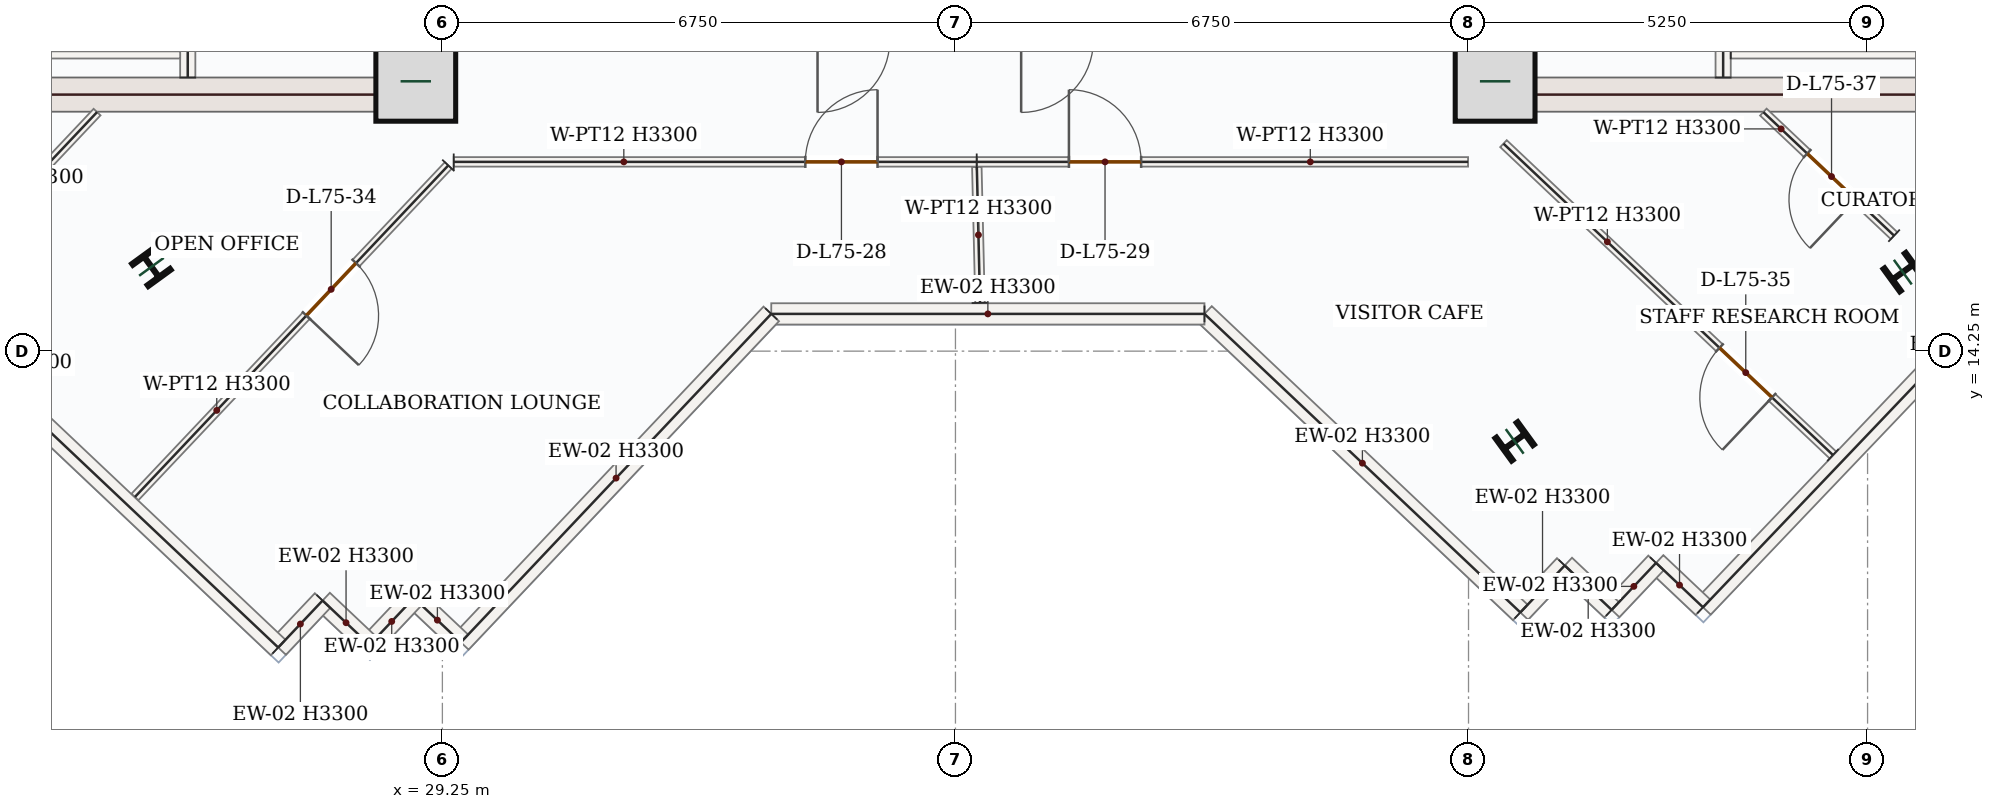
"""IFC4 building model, lengths in metres.
Left out: names, types, materials, properties, quantities, classifications, styles, units other than length and angle.
Written with IfcOpenShell. Run it as: python <this file> out.ifc"""

import sys

from ifc_helpers import new_model, si_unit, direction, frame, frame_2d, origin, origin_2d, place, context, subcontext, project, spatial, rectangle, i_section, extrude, source, transform, mapped, element, fill, save


model = new_model("IFC4")
c1 = context("Model", 3, precision=1e-05, world=origin(), true_north=direction((0.0, 1.0)))
c2 = subcontext(c1, "Body", "Model", "MODEL_VIEW")
j1 = project(units=[si_unit("LENGTHUNIT", "METRE"), si_unit("PLANEANGLEUNIT", "RADIAN")], contexts=[c1])
p1 = place(None, origin())
s1 = spatial("IfcSite", under=j1, at=p1, CompositionType="ELEMENT")
p2 = place(p1, origin())
s2 = spatial("IfcBuilding", under=s1, at=p2, CompositionType="ELEMENT")
p3 = place(p2, frame((0.0, 0.0, 310.35)))
s3 = spatial("IfcBuildingStorey", under=s2, at=p3, CompositionType="ELEMENT", Elevation=310.35)
p4 = place(p3, frame((29.025, 17.4, 0.0), z_axis=(0.0, 0.0, 1.0), x_axis=(0.0, 1.0, 0.0)))
e1 = element("IfcWall", 1, at=p4, inside=s3, PredefinedType="SHEAR", context=c2, shape_type="SweptSolid", body=[
    extrude(rectangle(XDim=8.55, YDim=0.45, at=frame_2d((4.275, 0.0))), origin(), (0.0, 0.0, 1.0), 3.3),
])
p5 = place(p4, frame((6.65, 0.0, 0.0)))
e2 = element("IfcOpeningElement", 2, at=p5, cuts=e1, PredefinedType="OPENING", context=c2, shape_type="SweptSolid", body=[
    extrude(rectangle(XDim=1.1, YDim=2.2, at=frame_2d((0.55, 1.1))), frame((0.0, 0.235, 0.0), z_axis=(0.0, -1.0, 0.0), x_axis=(1.0, 0.0, 0.0)), (0.0, 0.0, 1.0), 0.47),
])
p6 = place(p4, frame((2.7, 0.0, 0.0)))
e3 = element("IfcOpeningElement", 3, at=p6, cuts=e1, PredefinedType="OPENING", context=c2, shape_type="SweptSolid", body=[
    extrude(rectangle(XDim=0.88, YDim=2.1, at=frame_2d((0.44, 1.05))), frame((0.0, 0.235, 0.0), z_axis=(0.0, -1.0, 0.0), x_axis=(1.0, 0.0, 0.0)), (0.0, 0.0, 1.0), 0.47),
])
p7 = place(p4, frame((4.6, 0.0, 0.0)))
e4 = element("IfcOpeningElement", 4, at=p7, cuts=e1, PredefinedType="OPENING", context=c2, shape_type="SweptSolid", body=[
    extrude(rectangle(XDim=0.88, YDim=2.1, at=frame_2d((0.44, 1.05))), frame((0.0, 0.235, 0.0), z_axis=(0.0, -1.0, 0.0), x_axis=(1.0, 0.0, 0.0)), (0.0, 0.0, 1.0), 0.47),
])
m1 = source(origin(), c2, "Body", "SweptSolid", [
    extrude(rectangle(XDim=7.1, YDim=0.45, at=frame_2d((3.55, 0.0))), origin(), (0.0, 0.0, 1.0), 3.3),
])
p8 = place(p3, frame((21.7, 17.625, 0.0), z_axis=(0.0, 0.0, 1.0), x_axis=(1.0, 0.0, 0.0)))
e5 = element("IfcWall", 5, at=p8, inside=s3, PredefinedType="SHEAR", context=c2, shape_type="MappedRepresentation", body=[
    mapped(m1, transform((0.0, 0.0, 0.0), x_axis=(1.0, 0.0, 0.0), y_axis=(0.0, 1.0, 0.0), z_axis=(0.0, 0.0, 1.0), scale=1.0)),
])
p9 = place(p3, frame((42.975, 17.4, 0.0), z_axis=(0.0, 0.0, 1.0), x_axis=(0.0, 1.0, 0.0)))
e6 = element("IfcWall", 6, at=p9, inside=s3, PredefinedType="SHEAR", context=c2, shape_type="SweptSolid", body=[
    extrude(rectangle(XDim=8.55, YDim=0.45, at=frame_2d((4.275, 0.0))), origin(), (0.0, 0.0, 1.0), 3.3),
])
p10 = place(p9, frame((6.65, 0.0, 0.0)))
e7 = element("IfcOpeningElement", 7, at=p10, cuts=e6, PredefinedType="OPENING", context=c2, shape_type="SweptSolid", body=[
    extrude(rectangle(XDim=1.1, YDim=2.2, at=frame_2d((0.55, 1.1))), frame((0.0, 0.235, 0.0), z_axis=(0.0, -1.0, 0.0), x_axis=(1.0, 0.0, 0.0)), (0.0, 0.0, 1.0), 0.47),
])
p11 = place(p9, frame((1.75, 0.0, 0.0)))
e8 = element("IfcOpeningElement", 8, at=p11, cuts=e6, PredefinedType="OPENING", context=c2, shape_type="SweptSolid", body=[
    extrude(rectangle(XDim=1.3, YDim=2.2, at=frame_2d((0.65, 1.1))), frame((0.0, 0.235, 0.0), z_axis=(0.0, -1.0, 0.0), x_axis=(1.0, 0.0, 0.0)), (0.0, 0.0, 1.0), 0.47),
])
p12 = place(p9, frame((4.3, 0.0, 0.0)))
e9 = element("IfcOpeningElement", 9, at=p12, cuts=e6, PredefinedType="OPENING", context=c2, shape_type="SweptSolid", body=[
    extrude(rectangle(XDim=0.88, YDim=2.1, at=frame_2d((0.44, 1.05))), frame((0.0, 0.235, 0.0), z_axis=(0.0, -1.0, 0.0), x_axis=(1.0, 0.0, 0.0)), (0.0, 0.0, 1.0), 0.47),
])
p13 = place(p3, frame((43.2, 17.625, 0.0), z_axis=(0.0, 0.0, 1.0), x_axis=(1.0, 0.0, 0.0)))
e10 = element("IfcWall", 10, at=p13, inside=s3, PredefinedType="SHEAR", context=c2, shape_type="MappedRepresentation", body=[
    mapped(m1, transform((0.0, 0.0, 0.0), x_axis=(1.0, 0.0, 0.0), y_axis=(0.0, 1.0, 0.0), z_axis=(0.0, 0.0, 1.0), scale=1.0)),
])
m2 = source(origin(), c2, "Body", "SweptSolid", [
    extrude(rectangle(XDim=1.05, YDim=1.05, at=origin_2d()), origin(), (0.0, 0.0, 1.0), 3.75),
])
for number, where, z_axis, x_axis in (
    (11, (28.9, 17.8, 0.0), (0.0, 0.0, 1.0), (1.0, 0.0, 0.0)),
    (12, (43.1, 17.8, 0.0), (0.0, 0.0, 1.0), (1.0, 0.0, 0.0)),
):
    element("IfcColumn", number, at=place(p3, frame(where, z_axis=z_axis, x_axis=x_axis)), inside=s3, PredefinedType="COLUMN", context=c2, shape_type="MappedRepresentation", body=[
        mapped(m2, transform((0.0, 0.0, 0.0), x_axis=(1.0, 0.0, 0.0), y_axis=(0.0, 1.0, 0.0), z_axis=(0.0, 0.0, 1.0), scale=1.0)),
    ])
m3 = source(origin(), c2, "Body", "SweptSolid", [
    extrude(i_section(OverallWidth=0.374, OverallDepth=0.372, WebThickness=0.016, FlangeThickness=0.026, FilletRadius=0.018, at=origin_2d()), origin(), (0.0, 0.0, 1.0), 3.75),
])
for number, where, z_axis, x_axis in (
    (13, (25.422, 15.359, 0.0), (0.0, 0.0, 1.0), (0.809, 0.588, 0.0)),
    (14, (43.357, 13.063, 0.0), (0.0, 0.0, 1.0), (-0.588, 0.809, 0.0)),
    (15, (48.464, 15.289, 0.0), (0.0, 0.0, 1.0), (-0.588, 0.809, 0.0)),
):
    element("IfcColumn", number, at=place(p3, frame(where, z_axis=z_axis, x_axis=x_axis)), inside=s3, PredefinedType="COLUMN", context=c2, shape_type="MappedRepresentation", body=[
        mapped(m3, transform((0.0, 0.0, 0.0), x_axis=(1.0, 0.0, 0.0), y_axis=(0.0, 1.0, 0.0), z_axis=(0.0, 0.0, 1.0), scale=1.0)),
    ])
m4 = source(origin(), c2, "Body", "SweptSolid", [
    extrude(rectangle(XDim=10.47, YDim=0.28, at=frame_2d((5.235, 0.0))), origin(), (0.0, 0.0, 1.0), 3.3),
])
p14 = place(p3, frame((53.06, 18.458, 0.0), z_axis=(0.0, 0.0, 1.0), x_axis=(-0.690070788875, -0.723741878256, 0.0)))
e16 = element("IfcWall", 16, at=p14, inside=s3, PredefinedType="SOLIDWALL", context=c2, shape_type="MappedRepresentation", body=[
    mapped(m4, transform((0.0, 0.0, 0.0), x_axis=(1.0, 0.0, 0.0), y_axis=(0.0, 1.0, 0.0), z_axis=(0.0, 0.0, 1.0), scale=1.0)),
])
m5 = source(origin(), c2, "Body", "SweptSolid", [
    extrude(rectangle(XDim=0.85, YDim=0.28, at=frame_2d((0.425, 0.0))), origin(), (0.0, 0.0, 1.0), 3.3),
])
p15 = place(p3, frame((45.835, 10.88, 0.0), z_axis=(0.0, 0.0, 1.0), x_axis=(-0.726790047388, 0.686859685101, 0.0)))
e17 = element("IfcWall", 17, at=p15, inside=s3, PredefinedType="SOLIDWALL", context=c2, shape_type="MappedRepresentation", body=[
    mapped(m5, transform((0.0, 0.0, 0.0), x_axis=(1.0, 0.0, 0.0), y_axis=(0.0, 1.0, 0.0), z_axis=(0.0, 0.0, 1.0), scale=1.0)),
])
m6 = source(origin(), c2, "Body", "SweptSolid", [
    extrude(rectangle(XDim=0.85, YDim=0.28, at=frame_2d((0.425, 0.0))), origin(), (0.0, 0.0, 1.0), 3.3),
])
p16 = place(p3, frame((45.217, 11.464, 0.0), z_axis=(0.0, 0.0, 1.0), x_axis=(-0.687011382404, -0.726646654466, 0.0)))
e18 = element("IfcWall", 18, at=p16, inside=s3, PredefinedType="SOLIDWALL", context=c2, shape_type="MappedRepresentation", body=[
    mapped(m6, transform((0.0, 0.0, 0.0), x_axis=(1.0, 0.0, 0.0), y_axis=(0.0, 1.0, 0.0), z_axis=(0.0, 0.0, 1.0), scale=1.0)),
])
p17 = place(p3, frame((44.633, 10.846, 0.0), z_axis=(0.0, 0.0, 1.0), x_axis=(-0.726790047388, 0.686859685101, 0.0)))
e19 = element("IfcWall", 19, at=p17, inside=s3, PredefinedType="SOLIDWALL", context=c2, shape_type="MappedRepresentation", body=[
    mapped(m5, transform((0.0, 0.0, 0.0), x_axis=(1.0, 0.0, 0.0), y_axis=(0.0, 1.0, 0.0), z_axis=(0.0, 0.0, 1.0), scale=1.0)),
])
p18 = place(p3, frame((44.016, 11.43, 0.0), z_axis=(0.0, 0.0, 1.0), x_axis=(-0.687011382404, -0.726646654466, 0.0)))
e20 = element("IfcWall", 20, at=p18, inside=s3, PredefinedType="SOLIDWALL", context=c2, shape_type="MappedRepresentation", body=[
    mapped(m6, transform((0.0, 0.0, 0.0), x_axis=(1.0, 0.0, 0.0), y_axis=(0.0, 1.0, 0.0), z_axis=(0.0, 0.0, 1.0), scale=1.0)),
])
m7 = source(origin(), c2, "Body", "SweptSolid", [
    extrude(rectangle(XDim=5.718, YDim=0.28, at=frame_2d((2.859, 0.0))), origin(), (0.0, 0.0, 1.0), 3.3),
])
p19 = place(p3, frame((43.432, 10.812, 0.0), z_axis=(0.0, 0.0, 1.0), x_axis=(-0.726765623086, 0.686885528382, 0.0)))
e21 = element("IfcWall", 21, at=p19, inside=s3, PredefinedType="SOLIDWALL", context=c2, shape_type="MappedRepresentation", body=[
    mapped(m7, transform((0.0, 0.0, 0.0), x_axis=(1.0, 0.0, 0.0), y_axis=(0.0, 1.0, 0.0), z_axis=(0.0, 0.0, 1.0), scale=1.0)),
])
m8 = source(origin(), c2, "Body", "SweptSolid", [
    extrude(rectangle(XDim=5.699, YDim=0.28, at=frame_2d((2.85, 0.0))), origin(), (0.0, 0.0, 1.0), 3.3),
])
p20 = place(p3, frame((39.276, 14.74, 0.0), z_axis=(0.0, 0.0, 1.0), x_axis=(-1.0, 0.0, 0.0)))
e22 = element("IfcWall", 22, at=p20, inside=s3, PredefinedType="SOLIDWALL", context=c2, shape_type="MappedRepresentation", body=[
    mapped(m8, transform((0.0, 0.0, 0.0), x_axis=(1.0, 0.0, 0.0), y_axis=(0.0, 1.0, 0.0), z_axis=(0.0, 0.0, 1.0), scale=1.0)),
])
m9 = source(origin(), c2, "Body", "SweptSolid", [
    extrude(rectangle(XDim=5.945, YDim=0.28, at=frame_2d((2.973, 0.0))), origin(), (0.0, 0.0, 1.0), 3.3),
])
p21 = place(p3, frame((33.577, 14.74, 0.0), z_axis=(0.0, 0.0, 1.0), x_axis=(-0.686888766374, -0.72676256276, 0.0)))
e23 = element("IfcWall", 23, at=p21, inside=s3, PredefinedType="SOLIDWALL", context=c2, shape_type="MappedRepresentation", body=[
    mapped(m9, transform((0.0, 0.0, 0.0), x_axis=(1.0, 0.0, 0.0), y_axis=(0.0, 1.0, 0.0), z_axis=(0.0, 0.0, 1.0), scale=1.0)),
])
p22 = place(p3, frame((29.493, 10.419, 0.0), z_axis=(0.0, 0.0, 1.0), x_axis=(-0.726790047388, 0.686859685101, 0.0)))
e24 = element("IfcWall", 24, at=p22, inside=s3, PredefinedType="SOLIDWALL", context=c2, shape_type="MappedRepresentation", body=[
    mapped(m5, transform((0.0, 0.0, 0.0), x_axis=(1.0, 0.0, 0.0), y_axis=(0.0, 1.0, 0.0), z_axis=(0.0, 0.0, 1.0), scale=1.0)),
])
p23 = place(p3, frame((28.875, 11.003, 0.0), z_axis=(0.0, 0.0, 1.0), x_axis=(-0.687011382404, -0.726646654466, 0.0)))
e25 = element("IfcWall", 25, at=p23, inside=s3, PredefinedType="SOLIDWALL", context=c2, shape_type="MappedRepresentation", body=[
    mapped(m6, transform((0.0, 0.0, 0.0), x_axis=(1.0, 0.0, 0.0), y_axis=(0.0, 1.0, 0.0), z_axis=(0.0, 0.0, 1.0), scale=1.0)),
])
p24 = place(p3, frame((28.292, 10.385, 0.0), z_axis=(0.0, 0.0, 1.0), x_axis=(-0.726790047388, 0.686859685101, 0.0)))
e26 = element("IfcWall", 26, at=p24, inside=s3, PredefinedType="SOLIDWALL", context=c2, shape_type="MappedRepresentation", body=[
    mapped(m5, transform((0.0, 0.0, 0.0), x_axis=(1.0, 0.0, 0.0), y_axis=(0.0, 1.0, 0.0), z_axis=(0.0, 0.0, 1.0), scale=1.0)),
])
p25 = place(p3, frame((27.674, 10.969, 0.0), z_axis=(0.0, 0.0, 1.0), x_axis=(-0.687011382404, -0.726646654466, 0.0)))
e27 = element("IfcWall", 27, at=p25, inside=s3, PredefinedType="SOLIDWALL", context=c2, shape_type="MappedRepresentation", body=[
    mapped(m6, transform((0.0, 0.0, 0.0), x_axis=(1.0, 0.0, 0.0), y_axis=(0.0, 1.0, 0.0), z_axis=(0.0, 0.0, 1.0), scale=1.0)),
])
m10 = source(origin(), c2, "Body", "SweptSolid", [
    extrude(rectangle(XDim=9.92, YDim=0.28, at=frame_2d((4.96, 0.0))), origin(), (0.0, 0.0, 1.0), 3.3),
])
p26 = place(p3, frame((27.09, 10.351, 0.0), z_axis=(0.0, 0.0, 1.0), x_axis=(-0.726772856404, 0.686877875022, 0.0)))
e28 = element("IfcWall", 28, at=p26, inside=s3, PredefinedType="SOLIDWALL", context=c2, shape_type="MappedRepresentation", body=[
    mapped(m10, transform((0.0, 0.0, 0.0), x_axis=(1.0, 0.0, 0.0), y_axis=(0.0, 1.0, 0.0), z_axis=(0.0, 0.0, 1.0), scale=1.0)),
])
p27 = place(p3, frame((25.9, 17.85, 0.0), z_axis=(0.0, 0.0, 1.0), x_axis=(0.0, 1.0, 0.0)))
e29 = element("IfcWall", 29, at=p27, inside=s3, PredefinedType="SOLIDWALL", context=c2, shape_type="SweptSolid", body=[
    extrude(rectangle(XDim=8.0, YDim=0.2, at=frame_2d((4.0, 0.0))), origin(), (0.0, 0.0, 1.0), 3.3),
])
p28 = place(p27, frame((6.2, 0.0, 0.0)))
e30 = element("IfcOpeningElement", 30, at=p28, cuts=e29, PredefinedType="OPENING", context=c2, shape_type="SweptSolid", body=[
    extrude(rectangle(XDim=1.0, YDim=2.15, at=frame_2d((0.5, 1.075))), frame((0.0, 0.11, 0.0), z_axis=(0.0, -1.0, 0.0), x_axis=(1.0, 0.0, 0.0)), (0.0, 0.0, 1.0), 0.22),
])
p29 = place(p27, frame((0.6, 0.0, 0.0)))
e31 = element("IfcOpeningElement", 31, at=p29, cuts=e29, PredefinedType="OPENING", context=c2, shape_type="SweptSolid", body=[
    extrude(rectangle(XDim=0.88, YDim=2.1, at=frame_2d((0.44, 1.05))), frame((0.0, 0.11, 0.0), z_axis=(0.0, -1.0, 0.0), x_axis=(1.0, 0.0, 0.0)), (0.0, 0.0, 1.0), 0.22),
])
p30 = place(p3, frame((46.1, 17.85, 0.0), z_axis=(0.0, 0.0, 1.0), x_axis=(0.0, 1.0, 0.0)))
e32 = element("IfcWall", 32, at=p30, inside=s3, PredefinedType="SOLIDWALL", context=c2, shape_type="SweptSolid", body=[
    extrude(rectangle(XDim=8.0, YDim=0.2, at=frame_2d((4.0, 0.0))), origin(), (0.0, 0.0, 1.0), 3.3),
])
p31 = place(p30, frame((6.3, 0.0, 0.0)))
e33 = element("IfcOpeningElement", 33, at=p31, cuts=e32, PredefinedType="OPENING", context=c2, shape_type="SweptSolid", body=[
    extrude(rectangle(XDim=1.05, YDim=2.15, at=frame_2d((0.525, 1.075))), frame((0.0, 0.11, 0.0), z_axis=(0.0, -1.0, 0.0), x_axis=(1.0, 0.0, 0.0)), (0.0, 0.0, 1.0), 0.22),
])
m11 = source(origin(), c2, "Body", "SweptSolid", [
    extrude(rectangle(XDim=3.25, YDim=0.2, at=frame_2d((1.625, 0.0))), origin(), (0.0, 0.0, 1.0), 3.3),
])
for number, where, z_axis, x_axis in (
    (34, (22.55, 18.2, 0.0), (0.0, 0.0, 1.0), (1.0, 0.0, 0.0)),
    (35, (46.2, 18.2, 0.0), (0.0, 0.0, 1.0), (1.0, 0.0, 0.0)),
):
    element("IfcWall", number, at=place(p3, frame(where, z_axis=z_axis, x_axis=x_axis)), inside=s3, PredefinedType="SOLIDWALL", context=c2, shape_type="MappedRepresentation", body=[
        mapped(m11, transform((0.0, 0.0, 0.0), x_axis=(1.0, 0.0, 0.0), y_axis=(0.0, 1.0, 0.0), z_axis=(0.0, 0.0, 1.0), scale=1.0)),
    ])
p32 = place(p3, frame((48.349, 15.769, 0.0), z_axis=(0.0, 0.0, 1.0), x_axis=(-0.726735597886, 0.686917295433, 0.0)))
e36 = element("IfcWall", 36, at=p32, inside=s3, PredefinedType="PARTITIONING", context=c2, shape_type="SweptSolid", body=[
    extrude(rectangle(XDim=2.367, YDim=0.125, at=frame_2d((1.183, 0.0))), origin(), (0.0, 0.0, 1.0), 3.3),
])
p33 = place(p32, frame((0.692, 0.0, 0.0)))
e37 = element("IfcOpeningElement", 37, at=p33, cuts=e36, PredefinedType="OPENING", context=c2, shape_type="SweptSolid", body=[
    extrude(rectangle(XDim=0.88, YDim=2.1, at=frame_2d((0.44, 1.05))), frame((0.0, 0.073, 0.0), z_axis=(0.0, -1.0, 0.0), x_axis=(1.0, 0.0, 0.0)), (0.0, 0.0, 1.0), 0.145),
])
p34 = place(p3, frame((47.544, 12.883, 0.0), z_axis=(0.0, 0.0, 1.0), x_axis=(-0.726761082497, 0.686890332562, 0.0)))
e38 = element("IfcWall", 38, at=p34, inside=s3, PredefinedType="PARTITIONING", context=c2, shape_type="SweptSolid", body=[
    extrude(rectangle(XDim=5.964, YDim=0.125, at=frame_2d((2.982, 0.0))), origin(), (0.0, 0.0, 1.0), 3.3),
])
p35 = place(p34, frame((1.103, 0.0, 0.0)))
e39 = element("IfcOpeningElement", 39, at=p35, cuts=e38, PredefinedType="OPENING", context=c2, shape_type="SweptSolid", body=[
    extrude(rectangle(XDim=0.95, YDim=2.15, at=frame_2d((0.475, 1.075))), frame((0.0, 0.073, 0.0), z_axis=(0.0, -1.0, 0.0), x_axis=(1.0, 0.0, 0.0)), (0.0, 0.0, 1.0), 0.145),
])
m12 = source(origin(), c2, "Body", "SweptSolid", [
    extrude(rectangle(XDim=3.337, YDim=0.125, at=frame_2d((1.669, 0.0))), origin(), (0.0, 0.0, 1.0), 3.3),
])
p36 = place(p3, frame((22.415, 14.969, 0.0), z_axis=(0.0, 0.0, 1.0), x_axis=(0.686891986515, 0.726759519278, 0.0)))
e40 = element("IfcWall", 40, at=p36, inside=s3, PredefinedType="PARTITIONING", context=c2, shape_type="MappedRepresentation", body=[
    mapped(m12, transform((0.0, 0.0, 0.0), x_axis=(1.0, 0.0, 0.0), y_axis=(0.0, 1.0, 0.0), z_axis=(0.0, 0.0, 1.0), scale=1.0)),
])
p37 = place(p3, frame((29.328, 16.694, 0.0), z_axis=(0.0, 0.0, 1.0), x_axis=(-0.686871949206, -0.726778456886, 0.0)))
e41 = element("IfcWall", 41, at=p37, inside=s3, PredefinedType="PARTITIONING", context=c2, shape_type="SweptSolid", body=[
    extrude(rectangle(XDim=6.001, YDim=0.125, at=frame_2d((3.001, 0.0))), origin(), (0.0, 0.0, 1.0), 3.3),
])
p38 = place(p37, frame((1.768, 0.0, 0.0)))
e42 = element("IfcOpeningElement", 42, at=p38, cuts=e41, PredefinedType="OPENING", context=c2, shape_type="SweptSolid", body=[
    extrude(rectangle(XDim=0.95, YDim=2.15, at=frame_2d((0.475, 1.075))), frame((0.0, 0.073, 0.0), z_axis=(0.0, -1.0, 0.0), x_axis=(1.0, 0.0, 0.0)), (0.0, 0.0, 1.0), 0.145),
])
p39 = place(p3, frame((36.28, 16.74, 0.0), z_axis=(0.0, 0.0, 1.0), x_axis=(1.0, 0.0, 0.0)))
e43 = element("IfcWall", 43, at=p39, inside=s3, PredefinedType="PARTITIONING", context=c2, shape_type="SweptSolid", body=[
    extrude(rectangle(XDim=6.464, YDim=0.125, at=frame_2d((3.232, 0.0))), origin(), (0.0, 0.0, 1.0), 3.3),
])
p40 = place(p39, frame((1.213, 0.0, 0.0)))
e44 = element("IfcOpeningElement", 44, at=p40, cuts=e43, PredefinedType="OPENING", context=c2, shape_type="SweptSolid", body=[
    extrude(rectangle(XDim=0.95, YDim=2.15, at=frame_2d((0.475, 1.075))), frame((0.0, 0.073, 0.0), z_axis=(0.0, -1.0, 0.0), x_axis=(1.0, 0.0, 0.0)), (0.0, 0.0, 1.0), 0.145),
])
m13 = source(origin(), c2, "Body", "SweptSolid", [
    extrude(rectangle(XDim=1.788, YDim=0.125, at=frame_2d((0.894, 0.0))), origin(), (0.0, 0.0, 1.0), 3.3),
])
p41 = place(p3, frame((36.323, 14.885, 0.0), z_axis=(0.0, 0.0, 1.0), x_axis=(-0.023484370815, 0.999724204132, 0.0)))
e45 = element("IfcWall", 45, at=p41, inside=s3, PredefinedType="PARTITIONING", context=c2, shape_type="MappedRepresentation", body=[
    mapped(m13, transform((0.0, 0.0, 0.0), x_axis=(1.0, 0.0, 0.0), y_axis=(0.0, 1.0, 0.0), z_axis=(0.0, 0.0, 1.0), scale=1.0)),
])
p42 = place(p3, frame((29.399, 16.74, 0.0), z_axis=(0.0, 0.0, 1.0), x_axis=(1.0, 0.0, 0.0)))
e46 = element("IfcWall", 46, at=p42, inside=s3, PredefinedType="PARTITIONING", context=c2, shape_type="SweptSolid", body=[
    extrude(rectangle(XDim=6.881, YDim=0.125, at=frame_2d((3.44, 0.0))), origin(), (0.0, 0.0, 1.0), 3.3),
])
p43 = place(p42, frame((4.626, 0.0, 0.0)))
e47 = element("IfcOpeningElement", 47, at=p43, cuts=e46, PredefinedType="OPENING", context=c2, shape_type="SweptSolid", body=[
    extrude(rectangle(XDim=0.95, YDim=2.15, at=frame_2d((0.475, 1.075))), frame((0.0, 0.073, 0.0), z_axis=(0.0, -1.0, 0.0), x_axis=(1.0, 0.0, 0.0)), (0.0, 0.0, 1.0), 0.145),
])
m14 = source(origin(), c2, "Body", "SweptSolid", [
    extrude(rectangle(XDim=0.95, YDim=2.15, at=frame_2d((0.475, 1.075))), frame((0.0, 0.025, 0.0), z_axis=(0.0, -1.0, 0.0), x_axis=(1.0, 0.0, 0.0)), (0.0, 0.0, 1.0), 0.05),
])
p44 = place(p43, origin())
e48 = element("IfcDoor", 48, at=p44, inside=s3, OperationType="SINGLE_SWING_RIGHT", PredefinedType="DOOR", context=c2, shape_type="MappedRepresentation", body=[
    mapped(m14, transform((0.0, 0.0, 0.0), x_axis=(1.0, 0.0, 0.0), y_axis=(0.0, 1.0, 0.0), z_axis=(0.0, 0.0, 1.0), scale=1.0)),
])
fill(e47, e48)
p45 = place(p40, origin())
e49 = element("IfcDoor", 49, at=p45, inside=s3, OperationType="SINGLE_SWING_LEFT", PredefinedType="DOOR", context=c2, shape_type="MappedRepresentation", body=[
    mapped(m14, transform((0.0, 0.0, 0.0), x_axis=(1.0, 0.0, 0.0), y_axis=(0.0, 1.0, 0.0), z_axis=(0.0, 0.0, 1.0), scale=1.0)),
])
fill(e44, e49)
p46 = place(p38, origin())
e50 = element("IfcDoor", 50, at=p46, inside=s3, OperationType="SINGLE_SWING_RIGHT", PredefinedType="DOOR", context=c2, shape_type="MappedRepresentation", body=[
    mapped(m14, transform((0.0, 0.0, 0.0), x_axis=(1.0, 0.0, 0.0), y_axis=(0.0, 1.0, 0.0), z_axis=(0.0, 0.0, 1.0), scale=1.0)),
])
fill(e42, e50)
p47 = place(p35, origin())
e51 = element("IfcDoor", 51, at=p47, inside=s3, OperationType="SINGLE_SWING_LEFT", PredefinedType="DOOR", context=c2, shape_type="MappedRepresentation", body=[
    mapped(m14, transform((0.0, 0.0, 0.0), x_axis=(1.0, 0.0, 0.0), y_axis=(0.0, 1.0, 0.0), z_axis=(0.0, 0.0, 1.0), scale=1.0)),
])
fill(e39, e51)
m15 = source(origin(), c2, "Body", "SweptSolid", [
    extrude(rectangle(XDim=0.88, YDim=2.1, at=frame_2d((0.44, 1.05))), frame((0.0, 0.025, 0.0), z_axis=(0.0, -1.0, 0.0), x_axis=(1.0, 0.0, 0.0)), (0.0, 0.0, 1.0), 0.05),
])
p48 = place(p33, origin())
e52 = element("IfcDoor", 52, at=p48, inside=s3, OperationType="SINGLE_SWING_LEFT", PredefinedType="DOOR", context=c2, shape_type="MappedRepresentation", body=[
    mapped(m15, transform((0.0, 0.0, 0.0), x_axis=(1.0, 0.0, 0.0), y_axis=(0.0, 1.0, 0.0), z_axis=(0.0, 0.0, 1.0), scale=1.0)),
])
fill(e37, e52)
save(model, sys.argv[1])
